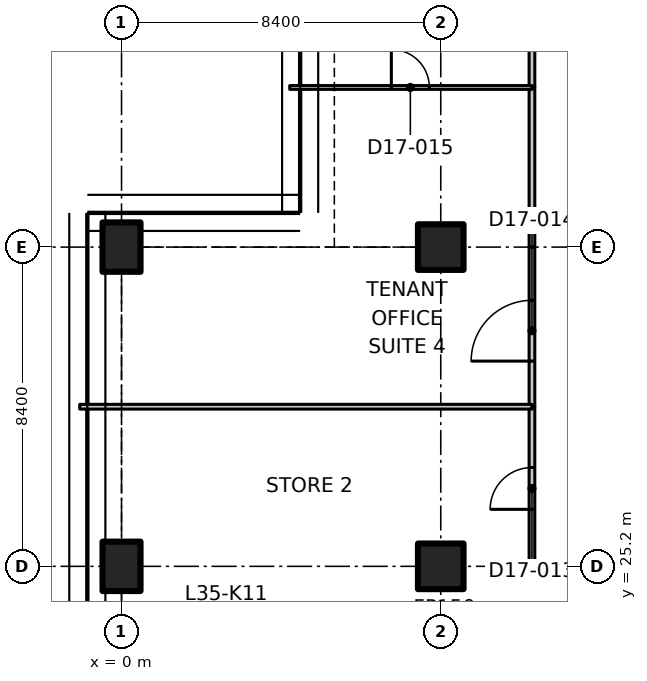
"""IFC4 building model, lengths in metres.
Left out: names, types, materials, properties, quantities, classifications, styles, units other than length and angle.
Written with IfcOpenShell. Run it as: python <this file> out.ifc"""

import sys

from ifc_helpers import new_model, si_unit, direction, frame, frame_2d, origin, origin_2d, place, context, subcontext, project, spatial, polyline, rectangle, outline, extrude, element, fill, save


model = new_model("IFC4")
c1 = context("Model", 3, precision=1e-05, world=origin(), true_north=direction((0.0, 1.0)))
c2 = subcontext(c1, "Body", "Model", "MODEL_VIEW")
j1 = project(units=[si_unit("LENGTHUNIT", "METRE"), si_unit("PLANEANGLEUNIT", "RADIAN")], contexts=[c1])
p1 = place(None, origin())
s1 = spatial("IfcSite", under=j1, at=p1, CompositionType="ELEMENT")
p2 = place(p1, origin())
s2 = spatial("IfcBuilding", under=s1, at=p2, CompositionType="ELEMENT")
p3 = place(p2, frame((0.0, 0.0, 142.1)))
s3 = spatial("IfcBuildingStorey", under=s2, at=p3, CompositionType="ELEMENT", Elevation=142.1)
for number, where, z_axis, x_axis in (
    (1, (0.0, 25.2, 0.0), (0.0, 0.0, 1.0), (1.0, 0.0, 0.0)),
    (2, (0.0, 33.6, 0.0), (0.0, 0.0, 1.0), (1.0, 0.0, 0.0)),
):
    element("IfcColumn", number, at=place(p3, frame(where, z_axis=z_axis, x_axis=x_axis)), inside=s3, PredefinedType="COLUMN", context=c2, shape_type="SweptSolid", body=[
        extrude(rectangle(XDim=1.0, YDim=1.3, at=origin_2d()), origin(), (0.0, 0.0, 1.0), 3.35),
    ])
for number, where, z_axis, x_axis in (
    (3, (8.4, 25.2, 0.0), (0.0, 0.0, 1.0), (1.0, 0.0, 0.0)),
    (4, (8.4, 33.6, 0.0), (0.0, 0.0, 1.0), (1.0, 0.0, 0.0)),
):
    element("IfcColumn", number, at=place(p3, frame(where, z_axis=z_axis, x_axis=x_axis)), inside=s3, PredefinedType="COLUMN", context=c2, shape_type="SweptSolid", body=[
        extrude(rectangle(XDim=1.2, YDim=1.2, at=origin_2d()), origin(), (0.0, 0.0, 1.0), 3.35),
    ])
p4 = place(p3, frame((10.8, 25.2, 0.0), z_axis=(0.0, 0.0, 1.0), x_axis=(0.0, 1.0, 0.0)))
e5 = element("IfcWall", 5, at=p4, inside=s3, PredefinedType="PARTITIONING", context=c2, shape_type="SweptSolid", body=[
    extrude(rectangle(XDim=4.2, YDim=0.15, at=frame_2d((2.1, 0.0))), origin(), (0.0, 0.0, 1.0), 3.33),
])
p5 = place(p4, frame((1.5, 0.0, 0.0)))
e6 = element("IfcOpeningElement", 6, at=p5, cuts=e5, PredefinedType="OPENING", context=c2, shape_type="SweptSolid", body=[
    extrude(rectangle(XDim=1.1, YDim=2.1, at=frame_2d((0.55, 1.05))), frame((0.0, 0.085, 0.0), z_axis=(0.0, -1.0, 0.0), x_axis=(1.0, 0.0, 0.0)), (0.0, 0.0, 1.0), 0.17),
])
p6 = place(p3, frame((10.8, 29.4, 0.0), z_axis=(0.0, 0.0, 1.0), x_axis=(0.0, 1.0, 0.0)))
e7 = element("IfcWall", 7, at=p6, inside=s3, PredefinedType="PARTITIONING", context=c2, shape_type="SweptSolid", body=[
    extrude(rectangle(XDim=4.2, YDim=0.15, at=frame_2d((2.1, 0.0))), origin(), (0.0, 0.0, 1.0), 3.33),
])
p7 = place(p6, frame((1.2, 0.0, 0.0)))
e8 = element("IfcOpeningElement", 8, at=p7, cuts=e7, PredefinedType="OPENING", context=c2, shape_type="SweptSolid", body=[
    extrude(rectangle(XDim=1.6, YDim=2.1, at=frame_2d((0.8, 1.05))), frame((0.0, 0.085, 0.0), z_axis=(0.0, -1.0, 0.0), x_axis=(1.0, 0.0, 0.0)), (0.0, 0.0, 1.0), 0.17),
])
for number, where, z_axis, x_axis in (
    (9, (10.8, 33.6, 0.0), (0.0, 0.0, 1.0), (0.0, 1.0, 0.0)),
    (10, (10.8, 37.8, 0.0), (0.0, 0.0, 1.0), (0.0, 1.0, 0.0)),
):
    element("IfcWall", number, at=place(p3, frame(where, z_axis=z_axis, x_axis=x_axis)), inside=s3, PredefinedType="PARTITIONING", context=c2, shape_type="SweptSolid", body=[
        extrude(rectangle(XDim=4.2, YDim=0.15, at=frame_2d((2.1, 0.0))), origin(), (0.0, 0.0, 1.0), 3.33),
    ])
p8 = place(p3, frame((-1.1, 29.4, 0.0), z_axis=(0.0, 0.0, 1.0), x_axis=(1.0, 0.0, 0.0)))
e11 = element("IfcWall", 11, at=p8, inside=s3, PredefinedType="PARTITIONING", context=c2, shape_type="SweptSolid", body=[
    extrude(outline(polyline([(0.0, 0.0), (11.9, 0.0), (11.9, 3.33), (1.55, 3.33), (1.548, 2.98), (0.652, 2.98), (0.65, 3.33), (0.0, 3.33), (0.0, 0.0)])), frame((0.0, 0.062, 0.0), z_axis=(0.0, -1.0, 0.0), x_axis=(1.0, 0.0, 0.0)), (0.0, 0.0, 1.0), 0.125),
])
p9 = place(p3, frame((4.426, 37.8, 0.0), z_axis=(0.0, 0.0, 1.0), x_axis=(1.0, 0.0, 0.0)))
e12 = element("IfcWall", 12, at=p9, inside=s3, PredefinedType="PARTITIONING", context=c2, shape_type="SweptSolid", body=[
    extrude(outline(polyline([(0.0, 0.0), (6.374, 0.0), (6.374, 3.33), (1.624, 3.33), (1.622, 2.98), (0.726, 2.98), (0.724, 3.33), (0.074, 3.33), (0.0, 3.33), (0.0, 0.0)])), frame((0.0, 0.05, 0.0), z_axis=(0.0, -1.0, 0.0), x_axis=(1.0, 0.0, 0.0)), (0.0, 0.0, 1.0), 0.1),
])
p10 = place(p9, frame((2.674, 0.0, 0.0)))
e13 = element("IfcOpeningElement", 13, at=p10, cuts=e12, PredefinedType="OPENING", context=c2, shape_type="SweptSolid", body=[
    extrude(rectangle(XDim=1.0, YDim=2.1, at=frame_2d((0.5, 1.05))), frame((0.0, 0.06, 0.0), z_axis=(0.0, -1.0, 0.0), x_axis=(1.0, 0.0, 0.0)), (0.0, 0.0, 1.0), 0.12),
])
p11 = place(p5, origin())
e14 = element("IfcDoor", 14, at=p11, inside=s3, OperationType="SINGLE_SWING_LEFT", PredefinedType="DOOR", context=c2, shape_type="SweptSolid", body=[
    extrude(rectangle(XDim=1.1, YDim=2.1, at=frame_2d((0.55, 1.05))), frame((0.0, 0.025, 0.0), z_axis=(0.0, -1.0, 0.0), x_axis=(1.0, 0.0, 0.0)), (0.0, 0.0, 1.0), 0.05),
])
fill(e6, e14)
p12 = place(p7, origin())
e15 = element("IfcDoor", 15, at=p12, inside=s3, OperationType="DOUBLE_DOOR_SINGLE_SWING", PredefinedType="DOOR", context=c2, shape_type="SweptSolid", body=[
    extrude(rectangle(XDim=1.6, YDim=2.1, at=frame_2d((0.8, 1.05))), frame((0.0, 0.025, 0.0), z_axis=(0.0, -1.0, 0.0), x_axis=(1.0, 0.0, 0.0)), (0.0, 0.0, 1.0), 0.05),
])
fill(e8, e15)
p13 = place(p10, origin())
e16 = element("IfcDoor", 16, at=p13, inside=s3, OperationType="SINGLE_SWING_LEFT", PredefinedType="DOOR", context=c2, shape_type="SweptSolid", body=[
    extrude(rectangle(XDim=1.0, YDim=2.1, at=frame_2d((0.5, 1.05))), frame((0.0, 0.025, 0.0), z_axis=(0.0, -1.0, 0.0), x_axis=(1.0, 0.0, 0.0)), (0.0, 0.0, 1.0), 0.05),
])
fill(e13, e16)
save(model, sys.argv[1])
